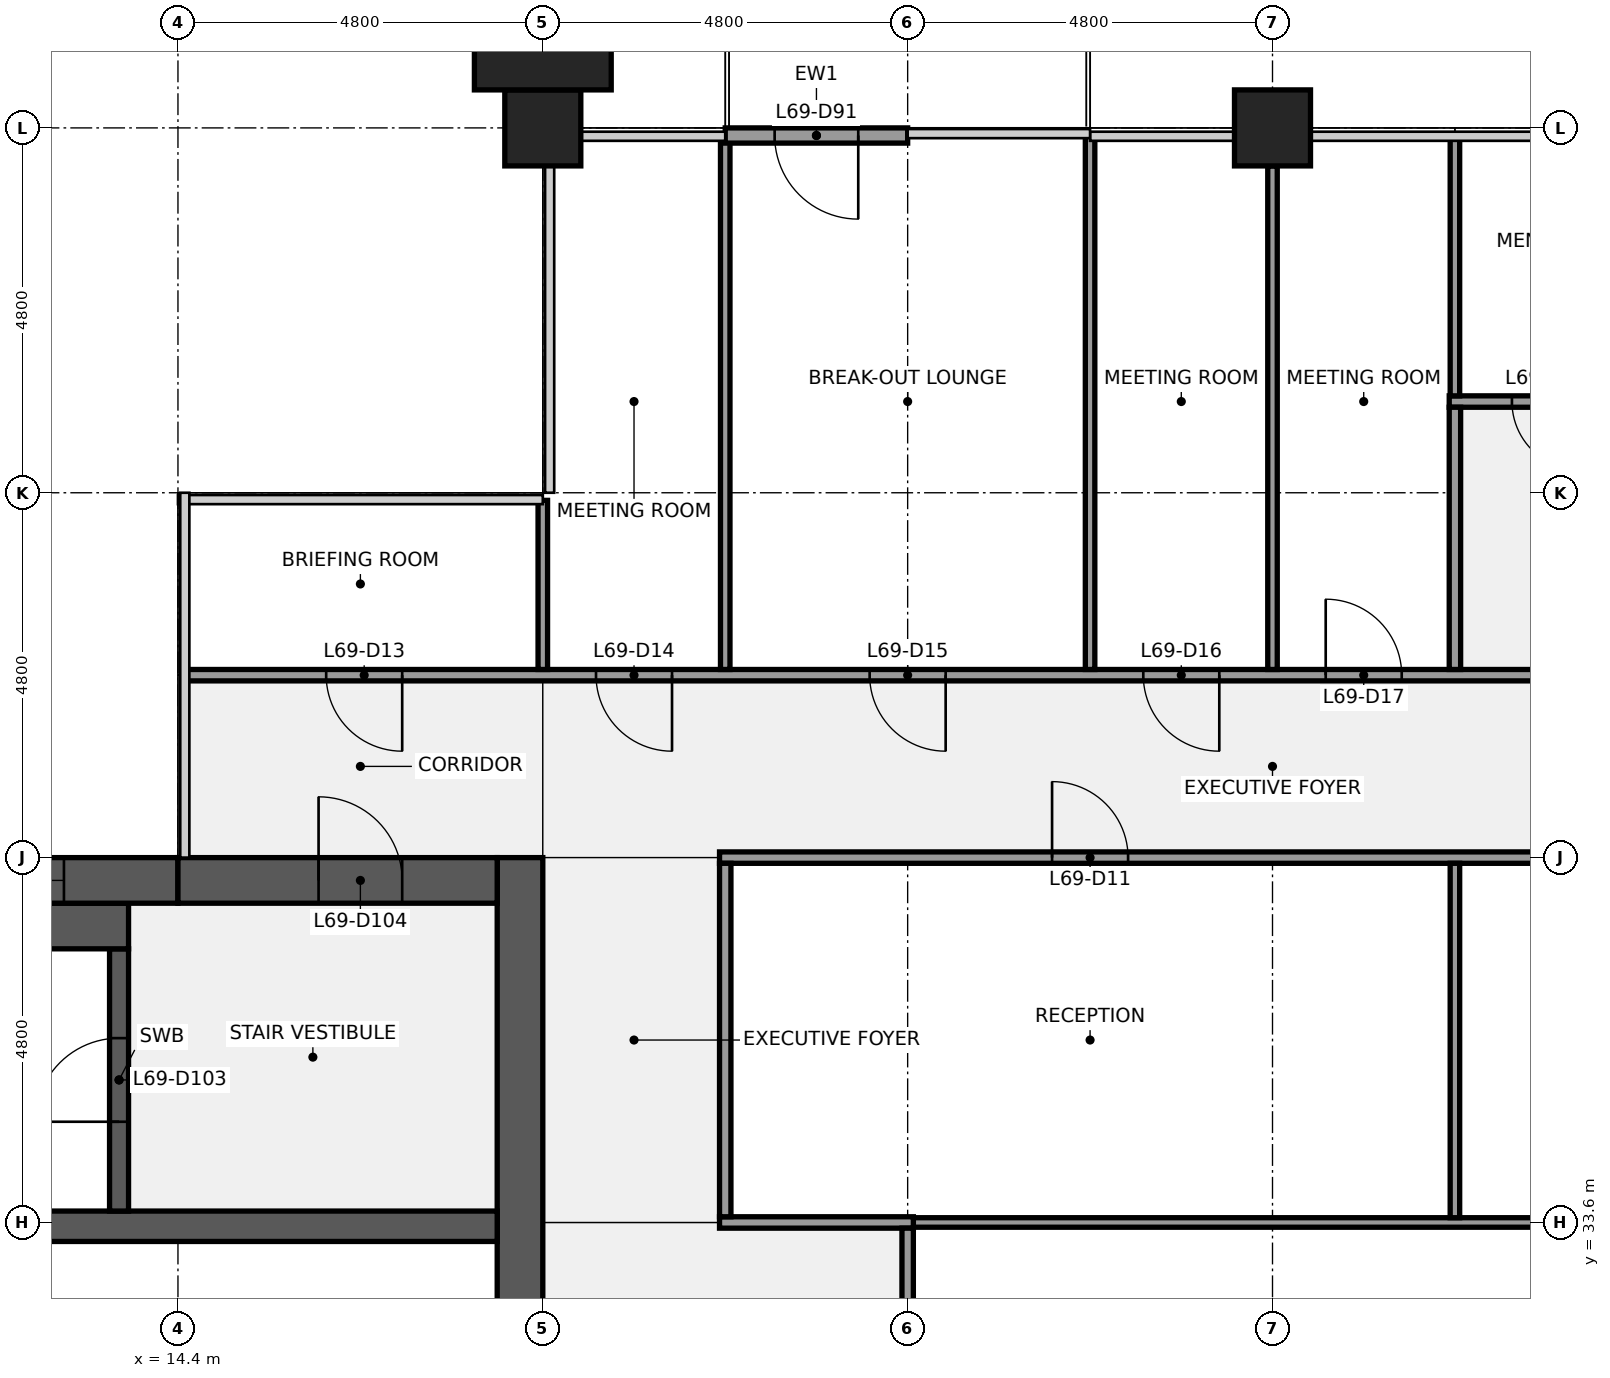
"""IFC4 building model, lengths in metres.
Left out: names, types, materials, properties, quantities, classifications, styles, units other than length and angle.
Written with IfcOpenShell. Run it as: python <this file> out.ifc"""

import sys

from ifc_helpers import new_model, si_unit, direction, frame, frame_2d, origin, origin_2d, place, context, subcontext, project, spatial, rectangle, extrude, element, fill, save


model = new_model("IFC4")
c1 = context("Model", 3, precision=1e-05, world=origin(), true_north=direction((0.0, 1.0)))
c2 = subcontext(c1, "Body", "Model", "MODEL_VIEW")
j1 = project(units=[si_unit("LENGTHUNIT", "METRE"), si_unit("PLANEANGLEUNIT", "RADIAN")], contexts=[c1])
p1 = place(None, origin())
s1 = spatial("IfcSite", under=j1, at=p1, CompositionType="ELEMENT")
p2 = place(p1, origin())
s2 = spatial("IfcBuilding", under=s1, at=p2, CompositionType="ELEMENT")
p3 = place(p2, frame((0.0, 0.0, 314.3)))
s3 = spatial("IfcBuildingStorey", under=s2, at=p3, CompositionType="ELEMENT", Elevation=314.3)
for number, where, z_axis, x_axis in (
    (1, (19.2, 48.0, 0.0), (0.0, 0.0, 1.0), (1.0, 0.0, 0.0)),
    (2, (28.8, 48.0, 0.0), (0.0, 0.0, 1.0), (1.0, 0.0, 0.0)),
):
    element("IfcColumn", number, at=place(p3, frame(where, z_axis=z_axis, x_axis=x_axis)), inside=s3, PredefinedType="COLUMN", context=c2, shape_type="SweptSolid", body=[
        extrude(rectangle(XDim=1.0, YDim=1.0, at=origin_2d()), origin(), (0.0, 0.0, 1.0), 4.0),
    ])
p4 = place(p3, frame((18.9, 38.4, 0.0), z_axis=(0.0, 0.0, 1.0), x_axis=(0.0, -1.0, 0.0)))
e3 = element("IfcWall", 3, at=p4, inside=s3, PredefinedType="SHEAR", context=c2, shape_type="SweptSolid", body=[
    extrude(rectangle(XDim=28.8, YDim=0.6, at=frame_2d((14.4, 0.0))), origin(), (0.0, 0.0, 1.0), 3.84),
])
p5 = place(p4, frame((18.3, 0.0, 0.0)))
e4 = element("IfcOpeningElement", 4, at=p5, cuts=e3, PredefinedType="OPENING", context=c2, shape_type="SweptSolid", body=[
    extrude(rectangle(XDim=1.8, YDim=2.1, at=frame_2d((0.9, 1.05))), frame((0.0, 0.31, 0.0), z_axis=(0.0, -1.0, 0.0), x_axis=(1.0, 0.0, 0.0)), (0.0, 0.0, 1.0), 0.62),
])
p6 = place(p4, frame((8.7, 0.0, 0.0)))
e5 = element("IfcOpeningElement", 5, at=p6, cuts=e3, PredefinedType="OPENING", context=c2, shape_type="SweptSolid", body=[
    extrude(rectangle(XDim=1.8, YDim=2.1, at=frame_2d((0.9, 1.05))), frame((0.0, 0.31, 0.0), z_axis=(0.0, -1.0, 0.0), x_axis=(1.0, 0.0, 0.0)), (0.0, 0.0, 1.0), 0.62),
])
p7 = place(p3, frame((0.6, 33.55, 0.0), z_axis=(0.0, 0.0, 1.0), x_axis=(1.0, 0.0, 0.0)))
e6 = element("IfcWall", 6, at=p7, inside=s3, PredefinedType="SHEAR", context=c2, shape_type="SweptSolid", body=[
    extrude(rectangle(XDim=18.0, YDim=0.4, at=frame_2d((9.0, 0.0))), origin(), (0.0, 0.0, 1.0), 3.84),
])
p8 = place(p3, frame((13.625, 33.75, 0.0), z_axis=(0.0, 0.0, 1.0), x_axis=(0.0, 1.0, 0.0)))
e7 = element("IfcWall", 7, at=p8, inside=s3, PredefinedType="SHEAR", context=c2, shape_type="SweptSolid", body=[
    extrude(rectangle(XDim=3.45, YDim=0.25, at=frame_2d((1.725, 0.0))), origin(), (0.0, 0.0, 1.0), 3.84),
])
p9 = place(p8, frame((1.175, 0.0, 0.0)))
e8 = element("IfcOpeningElement", 8, at=p9, cuts=e7, PredefinedType="OPENING", context=c2, shape_type="SweptSolid", body=[
    extrude(rectangle(XDim=1.1, YDim=2.1, at=frame_2d((0.55, 1.05))), frame((0.0, 0.135, 0.0), z_axis=(0.0, -1.0, 0.0), x_axis=(1.0, 0.0, 0.0)), (0.0, 0.0, 1.0), 0.27),
])
p10 = place(p3, frame((6.25, 37.5, 0.0), z_axis=(0.0, 0.0, 1.0), x_axis=(1.0, 0.0, 0.0)))
e9 = element("IfcWall", 9, at=p10, inside=s3, PredefinedType="SHEAR", context=c2, shape_type="SweptSolid", body=[
    extrude(rectangle(XDim=7.5, YDim=0.6, at=frame_2d((3.75, 0.0))), origin(), (0.0, 0.0, 1.0), 3.84),
])
p11 = place(p3, frame((0.6, 38.1, 0.0), z_axis=(0.0, 0.0, 1.0), x_axis=(1.0, 0.0, 0.0)))
e10 = element("IfcWall", 10, at=p11, inside=s3, PredefinedType="SHEAR", context=c2, shape_type="SweptSolid", body=[
    extrude(rectangle(XDim=13.8, YDim=0.6, at=frame_2d((6.9, 0.0))), origin(), (0.0, 0.0, 1.0), 3.84),
])
p12 = place(p11, frame((5.7, 0.0, 0.9)))
e11 = element("IfcOpeningElement", 11, at=p12, cuts=e10, PredefinedType="OPENING", context=c2, shape_type="SweptSolid", body=[
    extrude(rectangle(XDim=1.8, YDim=1.5, at=frame_2d((0.9, 0.75))), frame((0.0, 0.31, 0.0), z_axis=(0.0, -1.0, 0.0), x_axis=(1.0, 0.0, 0.0)), (0.0, 0.0, 1.0), 0.62),
])
p13 = place(p11, frame((10.5, 0.0, 0.9)))
e12 = element("IfcOpeningElement", 12, at=p13, cuts=e10, PredefinedType="OPENING", context=c2, shape_type="SweptSolid", body=[
    extrude(rectangle(XDim=1.8, YDim=1.5, at=frame_2d((0.9, 0.75))), frame((0.0, 0.31, 0.0), z_axis=(0.0, -1.0, 0.0), x_axis=(1.0, 0.0, 0.0)), (0.0, 0.0, 1.0), 0.62),
])
p14 = place(p3, frame((14.4, 38.1, 0.0), z_axis=(0.0, 0.0, 1.0), x_axis=(1.0, 0.0, 0.0)))
e13 = element("IfcWall", 13, at=p14, inside=s3, PredefinedType="SHEAR", context=c2, shape_type="SweptSolid", body=[
    extrude(rectangle(XDim=4.2, YDim=0.6, at=frame_2d((2.1, 0.0))), origin(), (0.0, 0.0, 1.0), 3.84),
])
p15 = place(p14, frame((1.85, 0.0, 0.0)))
e14 = element("IfcOpeningElement", 14, at=p15, cuts=e13, PredefinedType="OPENING", context=c2, shape_type="SweptSolid", body=[
    extrude(rectangle(XDim=1.1, YDim=2.1, at=frame_2d((0.55, 1.05))), frame((0.0, 0.31, 0.0), z_axis=(0.0, -1.0, 0.0), x_axis=(1.0, 0.0, 0.0)), (0.0, 0.0, 1.0), 0.62),
])
p16 = place(p3, frame((24.075, 33.6, 0.0), z_axis=(0.0, 0.0, 1.0), x_axis=(1.0, 0.0, 0.0)))
e15 = element("IfcWall", 15, at=p16, inside=s3, PredefinedType="PARTITIONING", context=c2, shape_type="SweptSolid", body=[
    extrude(rectangle(XDim=9.6, YDim=0.125, at=frame_2d((4.8, 0.0))), origin(), (0.0, 0.0, 1.0), 2.87),
])
p17 = place(p3, frame((21.525, 33.6, 0.0), z_axis=(0.0, 0.0, 1.0), x_axis=(1.0, 0.0, 0.0)))
e16 = element("IfcWall", 16, at=p17, inside=s3, PredefinedType="PARTITIONING", context=c2, shape_type="SweptSolid", body=[
    extrude(rectangle(XDim=2.55, YDim=0.15, at=frame_2d((1.275, 0.0))), origin(), (0.0, 0.0, 1.0), 2.87),
])
p18 = place(p3, frame((21.525, 38.4, 0.0), z_axis=(0.0, 0.0, 1.0), x_axis=(1.0, 0.0, 0.0)))
e17 = element("IfcWall", 17, at=p18, inside=s3, PredefinedType="PARTITIONING", context=c2, shape_type="SweptSolid", body=[
    extrude(rectangle(XDim=14.55, YDim=0.15, at=frame_2d((7.275, 0.0))), origin(), (0.0, 0.0, 1.0), 2.87),
])
p19 = place(p18, frame((4.375, 0.0, 0.0)))
e18 = element("IfcOpeningElement", 18, at=p19, cuts=e17, PredefinedType="OPENING", context=c2, shape_type="SweptSolid", body=[
    extrude(rectangle(XDim=1.0, YDim=2.1, at=frame_2d((0.5, 1.05))), frame((0.0, 0.085, 0.0), z_axis=(0.0, -1.0, 0.0), x_axis=(1.0, 0.0, 0.0)), (0.0, 0.0, 1.0), 0.17),
])
p20 = place(p18, frame((11.575, 0.0, 0.0)))
e19 = element("IfcOpeningElement", 19, at=p20, cuts=e17, PredefinedType="OPENING", context=c2, shape_type="SweptSolid", body=[
    extrude(rectangle(XDim=1.0, YDim=2.1, at=frame_2d((0.5, 1.05))), frame((0.0, 0.085, 0.0), z_axis=(0.0, -1.0, 0.0), x_axis=(1.0, 0.0, 0.0)), (0.0, 0.0, 1.0), 0.17),
])
p21 = place(p3, frame((14.5, 40.8, 0.0), z_axis=(0.0, 0.0, 1.0), x_axis=(1.0, 0.0, 0.0)))
e20 = element("IfcWall", 20, at=p21, inside=s3, PredefinedType="PARTITIONING", context=c2, shape_type="SweptSolid", body=[
    extrude(rectangle(XDim=28.6, YDim=0.15, at=frame_2d((14.3, 0.0))), origin(), (0.0, 0.0, 1.0), 2.87),
])
p22 = place(p21, frame((1.85, 0.0, 0.0)))
e21 = element("IfcOpeningElement", 21, at=p22, cuts=e20, PredefinedType="OPENING", context=c2, shape_type="SweptSolid", body=[
    extrude(rectangle(XDim=1.0, YDim=2.1, at=frame_2d((0.5, 1.05))), frame((0.0, 0.085, 0.0), z_axis=(0.0, -1.0, 0.0), x_axis=(1.0, 0.0, 0.0)), (0.0, 0.0, 1.0), 0.17),
])
p23 = place(p21, frame((5.4, 0.0, 0.0)))
e22 = element("IfcOpeningElement", 22, at=p23, cuts=e20, PredefinedType="OPENING", context=c2, shape_type="SweptSolid", body=[
    extrude(rectangle(XDim=1.0, YDim=2.1, at=frame_2d((0.5, 1.05))), frame((0.0, 0.085, 0.0), z_axis=(0.0, -1.0, 0.0), x_axis=(1.0, 0.0, 0.0)), (0.0, 0.0, 1.0), 0.17),
])
p24 = place(p21, frame((9.0, 0.0, 0.0)))
e23 = element("IfcOpeningElement", 23, at=p24, cuts=e20, PredefinedType="OPENING", context=c2, shape_type="SweptSolid", body=[
    extrude(rectangle(XDim=1.0, YDim=2.1, at=frame_2d((0.5, 1.05))), frame((0.0, 0.085, 0.0), z_axis=(0.0, -1.0, 0.0), x_axis=(1.0, 0.0, 0.0)), (0.0, 0.0, 1.0), 0.17),
])
p25 = place(p21, frame((12.6, 0.0, 0.0)))
e24 = element("IfcOpeningElement", 24, at=p25, cuts=e20, PredefinedType="OPENING", context=c2, shape_type="SweptSolid", body=[
    extrude(rectangle(XDim=1.0, YDim=2.1, at=frame_2d((0.5, 1.05))), frame((0.0, 0.085, 0.0), z_axis=(0.0, -1.0, 0.0), x_axis=(1.0, 0.0, 0.0)), (0.0, 0.0, 1.0), 0.17),
])
p26 = place(p21, frame((15.0, 0.0, 0.0)))
e25 = element("IfcOpeningElement", 25, at=p26, cuts=e20, PredefinedType="OPENING", context=c2, shape_type="SweptSolid", body=[
    extrude(rectangle(XDim=1.0, YDim=2.1, at=frame_2d((0.5, 1.05))), frame((0.0, 0.085, 0.0), z_axis=(0.0, -1.0, 0.0), x_axis=(1.0, 0.0, 0.0)), (0.0, 0.0, 1.0), 0.17),
])
p27 = place(p21, frame((19.8, 0.0, 0.0)))
e26 = element("IfcOpeningElement", 26, at=p27, cuts=e20, PredefinedType="OPENING", context=c2, shape_type="SweptSolid", body=[
    extrude(rectangle(XDim=1.0, YDim=2.1, at=frame_2d((0.5, 1.05))), frame((0.0, 0.085, 0.0), z_axis=(0.0, -1.0, 0.0), x_axis=(1.0, 0.0, 0.0)), (0.0, 0.0, 1.0), 0.17),
])
p28 = place(p21, frame((25.75, 0.0, 0.0)))
e27 = element("IfcOpeningElement", 27, at=p28, cuts=e20, PredefinedType="OPENING", context=c2, shape_type="SweptSolid", body=[
    extrude(rectangle(XDim=1.0, YDim=2.1, at=frame_2d((0.5, 1.05))), frame((0.0, 0.085, 0.0), z_axis=(0.0, -1.0, 0.0), x_axis=(1.0, 0.0, 0.0)), (0.0, 0.0, 1.0), 0.17),
])
p29 = place(p3, frame((31.125, 44.4, 0.0), z_axis=(0.0, 0.0, 1.0), x_axis=(1.0, 0.0, 0.0)))
e28 = element("IfcWall", 28, at=p29, inside=s3, PredefinedType="PARTITIONING", context=c2, shape_type="SweptSolid", body=[
    extrude(rectangle(XDim=7.175, YDim=0.15, at=frame_2d((3.587, 0.0))), origin(), (0.0, 0.0, 1.0), 2.87),
])
p30 = place(p29, frame((0.825, 0.0, 0.0)))
e29 = element("IfcOpeningElement", 29, at=p30, cuts=e28, PredefinedType="OPENING", context=c2, shape_type="SweptSolid", body=[
    extrude(rectangle(XDim=0.9, YDim=2.1, at=frame_2d((0.45, 1.05))), frame((0.0, 0.085, 0.0), z_axis=(0.0, -1.0, 0.0), x_axis=(1.0, 0.0, 0.0)), (0.0, 0.0, 1.0), 0.17),
])
p31 = place(p29, frame((3.225, 0.0, 0.0)))
e30 = element("IfcOpeningElement", 30, at=p31, cuts=e28, PredefinedType="OPENING", context=c2, shape_type="SweptSolid", body=[
    extrude(rectangle(XDim=0.9, YDim=2.1, at=frame_2d((0.45, 1.05))), frame((0.0, 0.085, 0.0), z_axis=(0.0, -1.0, 0.0), x_axis=(1.0, 0.0, 0.0)), (0.0, 0.0, 1.0), 0.17),
])
p32 = place(p29, frame((5.425, 0.0, 0.0)))
e31 = element("IfcOpeningElement", 31, at=p32, cuts=e28, PredefinedType="OPENING", context=c2, shape_type="SweptSolid", body=[
    extrude(rectangle(XDim=1.2, YDim=2.1, at=frame_2d((0.6, 1.05))), frame((0.0, 0.085, 0.0), z_axis=(0.0, -1.0, 0.0), x_axis=(1.0, 0.0, 0.0)), (0.0, 0.0, 1.0), 0.17),
])
p33 = place(p3, frame((19.2, 40.875, 0.0), z_axis=(0.0, 0.0, 1.0), x_axis=(0.0, 1.0, 0.0)))
e32 = element("IfcWall", 32, at=p33, inside=s3, PredefinedType="PARTITIONING", context=c2, shape_type="SweptSolid", body=[
    extrude(rectangle(XDim=2.225, YDim=0.125, at=frame_2d((1.113, 0.0))), origin(), (0.0, 0.0, 1.0), 2.87),
])
p34 = place(p3, frame((21.6, 40.875, 0.0), z_axis=(0.0, 0.0, 1.0), x_axis=(0.0, 1.0, 0.0)))
e33 = element("IfcWall", 33, at=p34, inside=s3, PredefinedType="PARTITIONING", context=c2, shape_type="SweptSolid", body=[
    extrude(rectangle(XDim=7.025, YDim=0.125, at=frame_2d((3.512, 0.0))), origin(), (0.0, 0.0, 1.0), 2.87),
])
p35 = place(p3, frame((21.6, 33.675, 0.0), z_axis=(0.0, 0.0, 1.0), x_axis=(0.0, 1.0, 0.0)))
e34 = element("IfcWall", 34, at=p35, inside=s3, PredefinedType="PARTITIONING", context=c2, shape_type="SweptSolid", body=[
    extrude(rectangle(XDim=4.65, YDim=0.15, at=frame_2d((2.325, 0.0))), origin(), (0.0, 0.0, 1.0), 2.87),
])
p36 = place(p3, frame((24.0, 27.663, 0.0), z_axis=(0.0, 0.0, 1.0), x_axis=(0.0, 1.0, 0.0)))
e35 = element("IfcWall", 35, at=p36, inside=s3, PredefinedType="PARTITIONING", context=c2, shape_type="SweptSolid", body=[
    extrude(rectangle(XDim=5.862, YDim=0.15, at=frame_2d((2.931, 0.0))), origin(), (0.0, 0.0, 1.0), 2.87),
])
p37 = place(p36, frame((2.431, 0.0, 0.0)))
e36 = element("IfcOpeningElement", 36, at=p37, cuts=e35, PredefinedType="OPENING", context=c2, shape_type="SweptSolid", body=[
    extrude(rectangle(XDim=1.0, YDim=2.1, at=frame_2d((0.5, 1.05))), frame((0.0, 0.085, 0.0), z_axis=(0.0, -1.0, 0.0), x_axis=(1.0, 0.0, 0.0)), (0.0, 0.0, 1.0), 0.17),
])
p38 = place(p3, frame((26.4, 40.875, 0.0), z_axis=(0.0, 0.0, 1.0), x_axis=(0.0, 1.0, 0.0)))
e37 = element("IfcWall", 37, at=p38, inside=s3, PredefinedType="PARTITIONING", context=c2, shape_type="SweptSolid", body=[
    extrude(rectangle(XDim=7.025, YDim=0.125, at=frame_2d((3.512, 0.0))), origin(), (0.0, 0.0, 1.0), 2.87),
])
p39 = place(p3, frame((28.8, 40.875, 0.0), z_axis=(0.0, 0.0, 1.0), x_axis=(0.0, 1.0, 0.0)))
e38 = element("IfcWall", 38, at=p39, inside=s3, PredefinedType="PARTITIONING", context=c2, shape_type="SweptSolid", body=[
    extrude(rectangle(XDim=6.625, YDim=0.125, at=frame_2d((3.312, 0.0))), origin(), (0.0, 0.0, 1.0), 2.87),
])
p40 = place(p3, frame((31.2, 33.663, 0.0), z_axis=(0.0, 0.0, 1.0), x_axis=(0.0, 1.0, 0.0)))
e39 = element("IfcWall", 39, at=p40, inside=s3, PredefinedType="PARTITIONING", context=c2, shape_type="SweptSolid", body=[
    extrude(rectangle(XDim=4.662, YDim=0.125, at=frame_2d((2.331, 0.0))), origin(), (0.0, 0.0, 1.0), 2.87),
])
p41 = place(p3, frame((31.2, 44.475, 0.0), z_axis=(0.0, 0.0, 1.0), x_axis=(0.0, 1.0, 0.0)))
e40 = element("IfcWall", 40, at=p41, inside=s3, PredefinedType="PARTITIONING", context=c2, shape_type="SweptSolid", body=[
    extrude(rectangle(XDim=3.425, YDim=0.125, at=frame_2d((1.712, 0.0))), origin(), (0.0, 0.0, 1.0), 2.87),
])
p42 = place(p3, frame((31.2, 40.875, 0.0), z_axis=(0.0, 0.0, 1.0), x_axis=(0.0, 1.0, 0.0)))
e41 = element("IfcWall", 41, at=p42, inside=s3, PredefinedType="PARTITIONING", context=c2, shape_type="SweptSolid", body=[
    extrude(rectangle(XDim=3.45, YDim=0.15, at=frame_2d((1.725, 0.0))), origin(), (0.0, 0.0, 1.0), 2.87),
])
p43 = place(p3, frame((24.0, 47.9, 0.0), z_axis=(0.0, 0.0, 1.0), x_axis=(-1.0, 0.0, 0.0)))
e42 = element("IfcWall", 42, at=p43, inside=s3, PredefinedType="SOLIDWALL", context=c2, shape_type="SweptSolid", body=[
    extrude(rectangle(XDim=2.4, YDim=0.2, at=frame_2d((1.2, 0.0))), origin(), (0.0, 0.0, 1.0), 3.314),
])
p44 = place(p43, frame((0.65, 0.0, 0.0)))
e43 = element("IfcOpeningElement", 43, at=p44, cuts=e42, PredefinedType="OPENING", context=c2, shape_type="SweptSolid", body=[
    extrude(rectangle(XDim=1.1, YDim=2.1, at=frame_2d((0.55, 1.05))), frame((0.0, 0.11, 0.0), z_axis=(0.0, -1.0, 0.0), x_axis=(1.0, 0.0, 0.0)), (0.0, 0.0, 1.0), 0.22),
])
p45 = place(p3, frame((19.2, 49.0, 0.0), z_axis=(0.0, 0.0, 1.0), x_axis=(1.0, 0.0, 0.0)))
e44 = element("IfcColumn", 44, at=p45, inside=s3, PredefinedType="PILASTER", context=c2, shape_type="SweptSolid", body=[
    extrude(rectangle(XDim=1.8, YDim=1.0, at=origin_2d()), origin(), (0.0, 0.0, 1.0), 4.0),
])
p46 = place(p9, origin())
e45 = element("IfcDoor", 45, at=p46, inside=s3, OperationType="SINGLE_SWING_LEFT", PredefinedType="DOOR", context=c2, shape_type="SweptSolid", body=[
    extrude(rectangle(XDim=1.1, YDim=2.1, at=frame_2d((0.55, 1.05))), frame((0.0, 0.025, 0.0), z_axis=(0.0, -1.0, 0.0), x_axis=(1.0, 0.0, 0.0)), (0.0, 0.0, 1.0), 0.05),
])
fill(e8, e45)
p47 = place(p15, origin())
e46 = element("IfcDoor", 46, at=p47, inside=s3, OperationType="SINGLE_SWING_LEFT", PredefinedType="DOOR", context=c2, shape_type="SweptSolid", body=[
    extrude(rectangle(XDim=1.1, YDim=2.1, at=frame_2d((0.55, 1.05))), frame((0.0, 0.025, 0.0), z_axis=(0.0, -1.0, 0.0), x_axis=(1.0, 0.0, 0.0)), (0.0, 0.0, 1.0), 0.05),
])
fill(e14, e46)
p48 = place(p13, origin())
e47 = element("IfcWindow", 47, at=p48, inside=s3, PartitioningType="SINGLE_PANEL", PredefinedType="WINDOW", context=c2, shape_type="SweptSolid", body=[
    extrude(rectangle(XDim=1.8, YDim=1.5, at=frame_2d((0.9, 0.75))), frame((0.0, 0.03, 0.0), z_axis=(0.0, -1.0, 0.0), x_axis=(1.0, 0.0, 0.0)), (0.0, 0.0, 1.0), 0.06),
])
fill(e12, e47)
p49 = place(p19, origin())
e48 = element("IfcDoor", 48, at=p49, inside=s3, OperationType="SINGLE_SWING_LEFT", PredefinedType="DOOR", context=c2, shape_type="SweptSolid", body=[
    extrude(rectangle(XDim=1.0, YDim=2.1, at=frame_2d((0.5, 1.05))), frame((0.0, 0.025, 0.0), z_axis=(0.0, -1.0, 0.0), x_axis=(1.0, 0.0, 0.0)), (0.0, 0.0, 1.0), 0.05),
])
fill(e18, e48)
p50 = place(p22, origin())
e49 = element("IfcDoor", 49, at=p50, inside=s3, OperationType="SINGLE_SWING_RIGHT", PredefinedType="DOOR", context=c2, shape_type="SweptSolid", body=[
    extrude(rectangle(XDim=1.0, YDim=2.1, at=frame_2d((0.5, 1.05))), frame((0.0, 0.025, 0.0), z_axis=(0.0, -1.0, 0.0), x_axis=(1.0, 0.0, 0.0)), (0.0, 0.0, 1.0), 0.05),
])
fill(e21, e49)
p51 = place(p23, origin())
e50 = element("IfcDoor", 50, at=p51, inside=s3, OperationType="SINGLE_SWING_RIGHT", PredefinedType="DOOR", context=c2, shape_type="SweptSolid", body=[
    extrude(rectangle(XDim=1.0, YDim=2.1, at=frame_2d((0.5, 1.05))), frame((0.0, 0.025, 0.0), z_axis=(0.0, -1.0, 0.0), x_axis=(1.0, 0.0, 0.0)), (0.0, 0.0, 1.0), 0.05),
])
fill(e22, e50)
p52 = place(p24, origin())
e51 = element("IfcDoor", 51, at=p52, inside=s3, OperationType="SINGLE_SWING_RIGHT", PredefinedType="DOOR", context=c2, shape_type="SweptSolid", body=[
    extrude(rectangle(XDim=1.0, YDim=2.1, at=frame_2d((0.5, 1.05))), frame((0.0, 0.025, 0.0), z_axis=(0.0, -1.0, 0.0), x_axis=(1.0, 0.0, 0.0)), (0.0, 0.0, 1.0), 0.05),
])
fill(e23, e51)
p53 = place(p25, origin())
e52 = element("IfcDoor", 52, at=p53, inside=s3, OperationType="SINGLE_SWING_RIGHT", PredefinedType="DOOR", context=c2, shape_type="SweptSolid", body=[
    extrude(rectangle(XDim=1.0, YDim=2.1, at=frame_2d((0.5, 1.05))), frame((0.0, 0.025, 0.0), z_axis=(0.0, -1.0, 0.0), x_axis=(1.0, 0.0, 0.0)), (0.0, 0.0, 1.0), 0.05),
])
fill(e24, e52)
p54 = place(p26, origin())
e53 = element("IfcDoor", 53, at=p54, inside=s3, OperationType="SINGLE_SWING_LEFT", PredefinedType="DOOR", context=c2, shape_type="SweptSolid", body=[
    extrude(rectangle(XDim=1.0, YDim=2.1, at=frame_2d((0.5, 1.05))), frame((0.0, 0.025, 0.0), z_axis=(0.0, -1.0, 0.0), x_axis=(1.0, 0.0, 0.0)), (0.0, 0.0, 1.0), 0.05),
])
fill(e25, e53)
p55 = place(p30, origin())
e54 = element("IfcDoor", 54, at=p55, inside=s3, OperationType="SINGLE_SWING_RIGHT", PredefinedType="DOOR", context=c2, shape_type="SweptSolid", body=[
    extrude(rectangle(XDim=0.9, YDim=2.1, at=frame_2d((0.45, 1.05))), frame((0.0, 0.025, 0.0), z_axis=(0.0, -1.0, 0.0), x_axis=(1.0, 0.0, 0.0)), (0.0, 0.0, 1.0), 0.05),
])
fill(e29, e54)
p56 = place(p44, origin())
e55 = element("IfcDoor", 55, at=p56, inside=s3, OperationType="SINGLE_SWING_LEFT", PredefinedType="DOOR", context=c2, shape_type="SweptSolid", body=[
    extrude(rectangle(XDim=1.1, YDim=2.1, at=frame_2d((0.55, 1.05))), frame((0.0, 0.025, 0.0), z_axis=(0.0, -1.0, 0.0), x_axis=(1.0, 0.0, 0.0)), (0.0, 0.0, 1.0), 0.05),
])
fill(e43, e55)
save(model, sys.argv[1])
